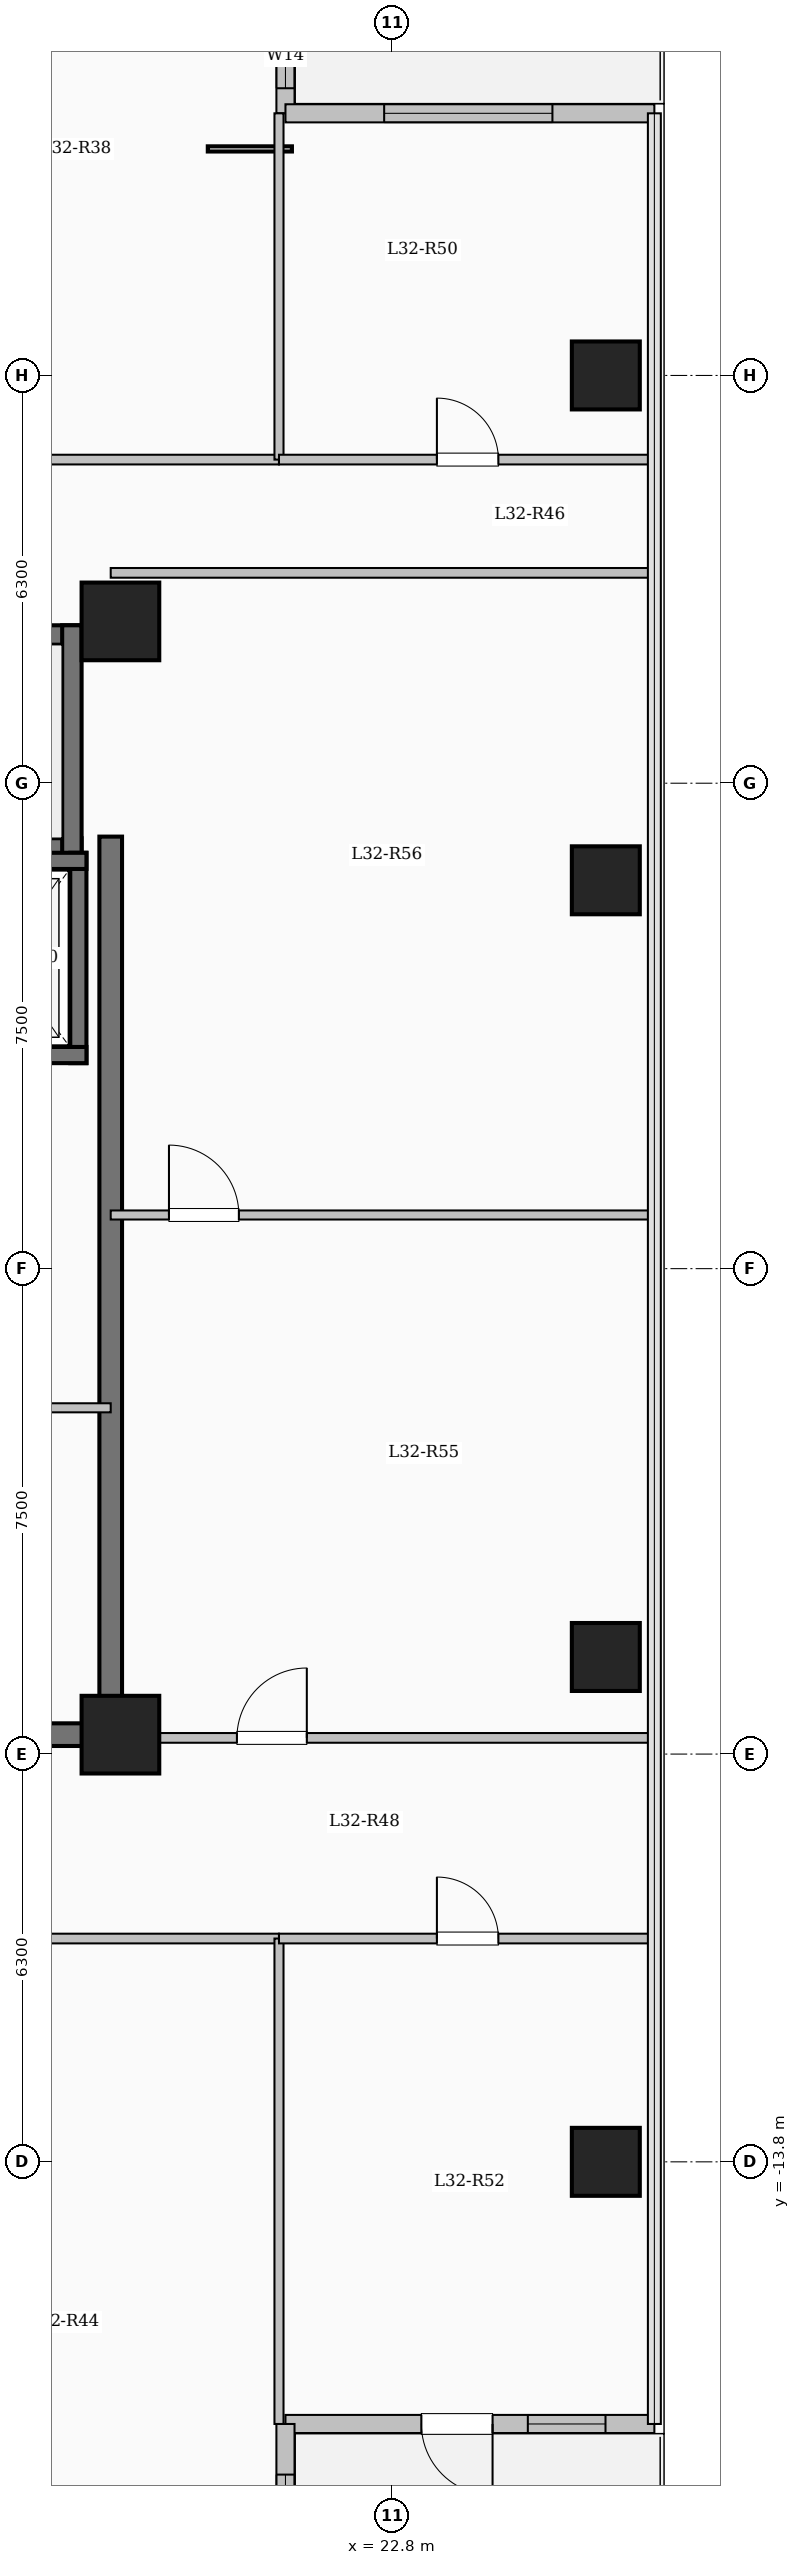
"""IFC4 building model, lengths in metres.
Left out: names, types, materials, properties, quantities, classifications, styles, units other than length and angle.
Written with IfcOpenShell. Run it as: python <this file> out.ifc"""

import sys

from ifc_helpers import new_model, si_unit, direction, frame, frame_2d, origin, origin_2d, place, context, subcontext, project, spatial, rectangle, extrude, element, fill, save


model = new_model("IFC4")
c1 = context("Model", 3, precision=1e-05, world=origin(), true_north=direction((0.0, 1.0)))
c2 = subcontext(c1, "Body", "Model", "MODEL_VIEW")
j1 = project(units=[si_unit("LENGTHUNIT", "METRE"), si_unit("PLANEANGLEUNIT", "RADIAN")], contexts=[c1])
p1 = place(None, origin())
s1 = spatial("IfcSite", under=j1, at=p1, CompositionType="ELEMENT")
p2 = place(p1, origin())
s2 = spatial("IfcBuilding", under=s1, at=p2, CompositionType="ELEMENT")
p3 = place(p2, frame((0.0, 0.0, 118.5)))
s3 = spatial("IfcBuildingStorey", under=s2, at=p3, CompositionType="ELEMENT", Elevation=118.5)
for number, where, z_axis, x_axis in (
    (1, (18.6, -7.2, 0.0), (0.0, 0.0, 1.0), (1.0, 0.0, 0.0)),
    (2, (18.6, 10.0, 0.0), (0.0, 0.0, 1.0), (1.0, 0.0, 0.0)),
):
    element("IfcColumn", number, at=place(p3, frame(where, z_axis=z_axis, x_axis=x_axis)), inside=s3, PredefinedType="COLUMN", context=c2, shape_type="SweptSolid", body=[
        extrude(rectangle(XDim=1.2, YDim=1.2, at=origin_2d()), origin(), (0.0, 0.0, 1.0), 4.5),
    ])
for number, where, z_axis, x_axis in (
    (3, (26.1, -13.8, 0.0), (0.0, 0.0, 1.0), (1.0, 0.0, 0.0)),
    (4, (26.1, -6.0, 0.0), (0.0, 0.0, 1.0), (1.0, 0.0, 0.0)),
    (5, (26.1, 6.0, 0.0), (0.0, 0.0, 1.0), (1.0, 0.0, 0.0)),
    (6, (26.1, 13.8, 0.0), (0.0, 0.0, 1.0), (1.0, 0.0, 0.0)),
):
    element("IfcColumn", number, at=place(p3, frame(where, z_axis=z_axis, x_axis=x_axis)), inside=s3, PredefinedType="COLUMN", context=c2, shape_type="SweptSolid", body=[
        extrude(rectangle(XDim=1.05, YDim=1.05, at=origin_2d()), origin(), (0.0, 0.0, 1.0), 4.5),
    ])
p4 = place(p3, frame((21.15, 22.05, 0.0), z_axis=(0.0, 0.0, 1.0), x_axis=(0.0, -1.0, 0.0)))
e7 = element("IfcWall", 7, at=p4, inside=s3, PredefinedType="SOLIDWALL", context=c2, shape_type="SweptSolid", body=[
    extrude(rectangle(XDim=4.2, YDim=0.28, at=frame_2d((2.1, 0.0))), origin(), (0.0, 0.0, 1.0), 4.2),
])
p5 = place(p4, frame((1.5, 0.0, 0.0)))
e8 = element("IfcOpeningElement", 8, at=p5, cuts=e7, PredefinedType="OPENING", context=c2, shape_type="SweptSolid", body=[
    extrude(rectangle(XDim=1.1, YDim=2.2, at=frame_2d((0.55, 1.1))), frame((0.0, 0.15, 0.0), z_axis=(0.0, -1.0, 0.0), x_axis=(1.0, 0.0, 0.0)), (0.0, 0.0, 1.0), 0.3),
])
p6 = place(p4, frame((2.812, 0.0, 0.95)))
e9 = element("IfcOpeningElement", 9, at=p6, cuts=e7, PredefinedType="OPENING", context=c2, shape_type="SweptSolid", body=[
    extrude(rectangle(XDim=1.0, YDim=1.5, at=frame_2d((0.5, 0.75))), frame((0.0, 0.15, 0.0), z_axis=(0.0, -1.0, 0.0), x_axis=(1.0, 0.0, 0.0)), (0.0, 0.0, 1.0), 0.3),
])
p7 = place(p3, frame((21.15, 17.85, 0.0), z_axis=(0.0, 0.0, 1.0), x_axis=(1.0, 0.0, 0.0)))
e10 = element("IfcWall", 10, at=p7, inside=s3, PredefinedType="SOLIDWALL", context=c2, shape_type="SweptSolid", body=[
    extrude(rectangle(XDim=5.7, YDim=0.28, at=frame_2d((2.85, 0.0))), origin(), (0.0, 0.0, 1.0), 4.2),
])
p8 = place(p7, frame((1.525, 0.0, 0.85)))
e11 = element("IfcOpeningElement", 11, at=p8, cuts=e10, PredefinedType="OPENING", context=c2, shape_type="SweptSolid", body=[
    extrude(rectangle(XDim=2.6, YDim=2.4, at=frame_2d((1.3, 1.2))), frame((0.0, 0.15, 0.0), z_axis=(0.0, -1.0, 0.0), x_axis=(1.0, 0.0, 0.0)), (0.0, 0.0, 1.0), 0.3),
])
p9 = place(p3, frame((26.85, -17.85, 0.0), z_axis=(0.0, 0.0, 1.0), x_axis=(-1.0, 0.0, 0.0)))
e12 = element("IfcWall", 12, at=p9, inside=s3, PredefinedType="SOLIDWALL", context=c2, shape_type="SweptSolid", body=[
    extrude(rectangle(XDim=5.7, YDim=0.28, at=frame_2d((2.85, 0.0))), origin(), (0.0, 0.0, 1.0), 4.2),
])
p10 = place(p9, frame((2.5, 0.0, 0.0)))
e13 = element("IfcOpeningElement", 13, at=p10, cuts=e12, PredefinedType="OPENING", context=c2, shape_type="SweptSolid", body=[
    extrude(rectangle(XDim=1.1, YDim=2.2, at=frame_2d((0.55, 1.1))), frame((0.0, 0.15, 0.0), z_axis=(0.0, -1.0, 0.0), x_axis=(1.0, 0.0, 0.0)), (0.0, 0.0, 1.0), 0.3),
])
p11 = place(p9, frame((0.755, 0.0, 0.95)))
e14 = element("IfcOpeningElement", 14, at=p11, cuts=e12, PredefinedType="OPENING", context=c2, shape_type="SweptSolid", body=[
    extrude(rectangle(XDim=1.2, YDim=1.5, at=frame_2d((0.6, 0.75))), frame((0.0, 0.15, 0.0), z_axis=(0.0, -1.0, 0.0), x_axis=(1.0, 0.0, 0.0)), (0.0, 0.0, 1.0), 0.3),
])
p12 = place(p3, frame((21.15, -17.85, 0.0), z_axis=(0.0, 0.0, 1.0), x_axis=(0.0, -1.0, 0.0)))
e15 = element("IfcWall", 15, at=p12, inside=s3, PredefinedType="SOLIDWALL", context=c2, shape_type="SweptSolid", body=[
    extrude(rectangle(XDim=4.2, YDim=0.28, at=frame_2d((2.1, 0.0))), origin(), (0.0, 0.0, 1.0), 4.2),
])
p13 = place(p12, frame((0.782, 0.0, 0.85)))
e16 = element("IfcOpeningElement", 16, at=p13, cuts=e15, PredefinedType="OPENING", context=c2, shape_type="SweptSolid", body=[
    extrude(rectangle(XDim=2.6, YDim=2.4, at=frame_2d((1.3, 1.2))), frame((0.0, 0.15, 0.0), z_axis=(0.0, -1.0, 0.0), x_axis=(1.0, 0.0, 0.0)), (0.0, 0.0, 1.0), 0.3),
])
p14 = place(p3, frame((10.0, 9.79, 0.0), z_axis=(0.0, 0.0, 1.0), x_axis=(1.0, 0.0, 0.0)))
e17 = element("IfcWall", 17, at=p14, inside=s3, PredefinedType="SHEAR", context=c2, shape_type="SweptSolid", body=[
    extrude(rectangle(XDim=8.0, YDim=0.3, at=frame_2d((4.0, 0.0))), origin(), (0.0, 0.0, 1.0), 4.5),
])
p15 = place(p3, frame((10.0, 6.5, 0.0), z_axis=(0.0, 0.0, 1.0), x_axis=(1.0, 0.0, 0.0)))
e18 = element("IfcWall", 18, at=p15, inside=s3, PredefinedType="SHEAR", context=c2, shape_type="SweptSolid", body=[
    extrude(rectangle(XDim=8.0, YDim=0.3, at=frame_2d((4.0, 0.0))), origin(), (0.0, 0.0, 1.0), 4.5),
])
p16 = place(p15, frame((0.55, 0.0, 0.0)))
e19 = element("IfcOpeningElement", 19, at=p16, cuts=e18, PredefinedType="OPENING", context=c2, shape_type="SweptSolid", body=[
    extrude(rectangle(XDim=1.0, YDim=2.15, at=frame_2d((0.5, 1.075))), frame((0.0, 0.16, 0.0), z_axis=(0.0, -1.0, 0.0), x_axis=(1.0, 0.0, 0.0)), (0.0, 0.0, 1.0), 0.32),
])
p17 = place(p3, frame((17.85, 6.35, 0.0), z_axis=(0.0, 0.0, 1.0), x_axis=(0.0, 1.0, 0.0)))
e20 = element("IfcWall", 20, at=p17, inside=s3, PredefinedType="SHEAR", context=c2, shape_type="SweptSolid", body=[
    extrude(rectangle(XDim=3.59, YDim=0.3, at=frame_2d((1.795, 0.0))), origin(), (0.0, 0.0, 1.0), 4.5),
])
p18 = place(p3, frame((17.95, 3.175, 0.0), z_axis=(0.0, 0.0, 1.0), x_axis=(0.0, 1.0, 0.0)))
e21 = element("IfcWall", 21, at=p18, inside=s3, PredefinedType="SHEAR", context=c2, shape_type="SweptSolid", body=[
    extrude(rectangle(XDim=3.25, YDim=0.25, at=frame_2d((1.625, 0.0))), origin(), (0.0, 0.0, 1.0), 4.5),
])
for number, where, z_axis, x_axis in (
    (22, (15.525, 3.3, 0.0), (0.0, 0.0, 1.0), (1.0, 0.0, 0.0)),
    (23, (15.525, 6.3, 0.0), (0.0, 0.0, 1.0), (1.0, 0.0, 0.0)),
):
    element("IfcWall", number, at=place(p3, frame(where, z_axis=z_axis, x_axis=x_axis)), inside=s3, PredefinedType="SHEAR", context=c2, shape_type="SweptSolid", body=[
        extrude(rectangle(XDim=2.55, YDim=0.25, at=frame_2d((1.275, 0.0))), origin(), (0.0, 0.0, 1.0), 4.5),
    ])
p19 = place(p3, frame((18.45, -7.375, 0.0), z_axis=(0.0, 0.0, 1.0), x_axis=(0.0, 1.0, 0.0)))
e24 = element("IfcWall", 24, at=p19, inside=s3, PredefinedType="SHEAR", context=c2, shape_type="SweptSolid", body=[
    extrude(rectangle(XDim=14.05, YDim=0.35, at=frame_2d((7.025, 0.0))), origin(), (0.0, 0.0, 1.0), 4.5),
])
p20 = place(p3, frame((10.075, -7.2, 0.0), z_axis=(0.0, 0.0, 1.0), x_axis=(1.0, 0.0, 0.0)))
e25 = element("IfcWall", 25, at=p20, inside=s3, PredefinedType="SHEAR", context=c2, shape_type="SweptSolid", body=[
    extrude(rectangle(XDim=8.55, YDim=0.35, at=frame_2d((4.275, 0.0))), origin(), (0.0, 0.0, 1.0), 4.5),
])
p21 = place(p3, frame((15.4, -2.15, 0.0), z_axis=(0.0, 0.0, 1.0), x_axis=(1.0, 0.0, 0.0)))
e26 = element("IfcWall", 26, at=p21, inside=s3, PredefinedType="PARTITIONING", context=c2, shape_type="SweptSolid", body=[
    extrude(rectangle(XDim=3.05, YDim=0.14, at=frame_2d((1.525, 0.0))), origin(), (0.0, 0.0, 1.0), 4.2),
])
p22 = place(p21, frame((1.05, 0.0, 0.0)))
e27 = element("IfcOpeningElement", 27, at=p22, cuts=e26, PredefinedType="OPENING", context=c2, shape_type="SweptSolid", body=[
    extrude(rectangle(XDim=0.9, YDim=2.08, at=frame_2d((0.45, 1.04))), frame((0.0, 0.08, 0.0), z_axis=(0.0, -1.0, 0.0), x_axis=(1.0, 0.0, 0.0)), (0.0, 0.0, 1.0), 0.16),
])
p23 = place(p3, frame((3.85, 12.5, 0.0), z_axis=(0.0, 0.0, 1.0), x_axis=(1.0, 0.0, 0.0)))
e28 = element("IfcWall", 28, at=p23, inside=s3, PredefinedType="PARTITIONING", context=c2, shape_type="SweptSolid", body=[
    extrude(rectangle(XDim=17.2, YDim=0.15, at=frame_2d((8.6, 0.0))), origin(), (0.0, 0.0, 1.0), 4.2),
])
p24 = place(p23, frame((0.8, 0.0, 0.0)))
e29 = element("IfcOpeningElement", 29, at=p24, cuts=e28, PredefinedType="OPENING", context=c2, shape_type="SweptSolid", body=[
    extrude(rectangle(XDim=0.95, YDim=2.15, at=frame_2d((0.475, 1.075))), frame((0.0, 0.085, 0.0), z_axis=(0.0, -1.0, 0.0), x_axis=(1.0, 0.0, 0.0)), (0.0, 0.0, 1.0), 0.17),
])
p25 = place(p23, frame((3.6, 0.0, 0.0)))
e30 = element("IfcOpeningElement", 30, at=p25, cuts=e28, PredefinedType="OPENING", context=c2, shape_type="SweptSolid", body=[
    extrude(rectangle(XDim=0.95, YDim=2.15, at=frame_2d((0.475, 1.075))), frame((0.0, 0.085, 0.0), z_axis=(0.0, -1.0, 0.0), x_axis=(1.0, 0.0, 0.0)), (0.0, 0.0, 1.0), 0.17),
])
p26 = place(p23, frame((6.55, 0.0, 0.0)))
e31 = element("IfcOpeningElement", 31, at=p26, cuts=e28, PredefinedType="OPENING", context=c2, shape_type="SweptSolid", body=[
    extrude(rectangle(XDim=1.08, YDim=2.15, at=frame_2d((0.54, 1.075))), frame((0.0, 0.085, 0.0), z_axis=(0.0, -1.0, 0.0), x_axis=(1.0, 0.0, 0.0)), (0.0, 0.0, 1.0), 0.17),
])
p27 = place(p23, frame((11.947, 0.0, 0.0)))
e32 = element("IfcOpeningElement", 32, at=p27, cuts=e28, PredefinedType="OPENING", context=c2, shape_type="SweptSolid", body=[
    extrude(rectangle(XDim=1.2, YDim=2.15, at=frame_2d((0.6, 1.075))), frame((0.0, 0.085, 0.0), z_axis=(0.0, -1.0, 0.0), x_axis=(1.0, 0.0, 0.0)), (0.0, 0.0, 1.0), 0.17),
])
p28 = place(p3, frame((8.55, -10.35, 0.0), z_axis=(0.0, 0.0, 1.0), x_axis=(1.0, 0.0, 0.0)))
e33 = element("IfcWall", 33, at=p28, inside=s3, PredefinedType="PARTITIONING", context=c2, shape_type="SweptSolid", body=[
    extrude(rectangle(XDim=12.5, YDim=0.15, at=frame_2d((6.25, 0.0))), origin(), (0.0, 0.0, 1.0), 4.2),
])
p29 = place(p28, frame((1.1, 0.0, 0.0)))
e34 = element("IfcOpeningElement", 34, at=p29, cuts=e33, PredefinedType="OPENING", context=c2, shape_type="SweptSolid", body=[
    extrude(rectangle(XDim=1.08, YDim=2.15, at=frame_2d((0.54, 1.075))), frame((0.0, 0.085, 0.0), z_axis=(0.0, -1.0, 0.0), x_axis=(1.0, 0.0, 0.0)), (0.0, 0.0, 1.0), 0.17),
])
p30 = place(p28, frame((6.777, 0.0, 0.0)))
e35 = element("IfcOpeningElement", 35, at=p30, cuts=e33, PredefinedType="OPENING", context=c2, shape_type="SweptSolid", body=[
    extrude(rectangle(XDim=1.2, YDim=2.15, at=frame_2d((0.6, 1.075))), frame((0.0, 0.085, 0.0), z_axis=(0.0, -1.0, 0.0), x_axis=(1.0, 0.0, 0.0)), (0.0, 0.0, 1.0), 0.17),
])
p31 = place(p3, frame((18.45, -7.25, 0.0), z_axis=(0.0, 0.0, 1.0), x_axis=(1.0, 0.0, 0.0)))
e36 = element("IfcWall", 36, at=p31, inside=s3, PredefinedType="PARTITIONING", context=c2, shape_type="SweptSolid", body=[
    extrude(rectangle(XDim=8.43, YDim=0.15, at=frame_2d((4.215, 0.0))), origin(), (0.0, 0.0, 1.0), 4.2),
])
p32 = place(p31, frame((1.95, 0.0, 0.0)))
e37 = element("IfcOpeningElement", 37, at=p32, cuts=e36, PredefinedType="OPENING", context=c2, shape_type="SweptSolid", body=[
    extrude(rectangle(XDim=1.08, YDim=2.15, at=frame_2d((0.54, 1.075))), frame((0.0, 0.085, 0.0), z_axis=(0.0, -1.0, 0.0), x_axis=(1.0, 0.0, 0.0)), (0.0, 0.0, 1.0), 0.17),
])
p33 = place(p3, frame((18.45, 10.75, 0.0), z_axis=(0.0, 0.0, 1.0), x_axis=(1.0, 0.0, 0.0)))
e38 = element("IfcWall", 38, at=p33, inside=s3, PredefinedType="PARTITIONING", context=c2, shape_type="SweptSolid", body=[
    extrude(rectangle(XDim=8.43, YDim=0.15, at=frame_2d((4.215, 0.0))), origin(), (0.0, 0.0, 1.0), 4.2),
])
p34 = place(p3, frame((21.05, -17.85, 0.0), z_axis=(0.0, 0.0, 1.0), x_axis=(0.0, 1.0, 0.0)))
e39 = element("IfcWall", 39, at=p34, inside=s3, PredefinedType="PARTITIONING", context=c2, shape_type="SweptSolid", body=[
    extrude(rectangle(XDim=7.5, YDim=0.14, at=frame_2d((3.75, 0.0))), origin(), (0.0, 0.0, 1.0), 4.2),
])
p35 = place(p3, frame((21.05, 12.5, 0.0), z_axis=(0.0, 0.0, 1.0), x_axis=(0.0, 1.0, 0.0)))
e40 = element("IfcWall", 40, at=p35, inside=s3, PredefinedType="PARTITIONING", context=c2, shape_type="SweptSolid", body=[
    extrude(rectangle(XDim=5.35, YDim=0.14, at=frame_2d((2.675, 0.0))), origin(), (0.0, 0.0, 1.0), 4.2),
])
p36 = place(p3, frame((21.05, 12.5, 0.0), z_axis=(0.0, 0.0, 1.0), x_axis=(1.0, 0.0, 0.0)))
e41 = element("IfcWall", 41, at=p36, inside=s3, PredefinedType="PARTITIONING", context=c2, shape_type="SweptSolid", body=[
    extrude(rectangle(XDim=5.83, YDim=0.15, at=frame_2d((2.915, 0.0))), origin(), (0.0, 0.0, 1.0), 4.2),
])
p37 = place(p36, frame((2.44, 0.0, 0.0)))
e42 = element("IfcOpeningElement", 42, at=p37, cuts=e41, PredefinedType="OPENING", context=c2, shape_type="SweptSolid", body=[
    extrude(rectangle(XDim=0.95, YDim=2.15, at=frame_2d((0.475, 1.075))), frame((0.0, 0.085, 0.0), z_axis=(0.0, -1.0, 0.0), x_axis=(1.0, 0.0, 0.0)), (0.0, 0.0, 1.0), 0.17),
])
p38 = place(p3, frame((21.05, -10.35, 0.0), z_axis=(0.0, 0.0, 1.0), x_axis=(1.0, 0.0, 0.0)))
e43 = element("IfcWall", 43, at=p38, inside=s3, PredefinedType="PARTITIONING", context=c2, shape_type="SweptSolid", body=[
    extrude(rectangle(XDim=5.83, YDim=0.15, at=frame_2d((2.915, 0.0))), origin(), (0.0, 0.0, 1.0), 4.2),
])
p39 = place(p38, frame((2.44, 0.0, 0.0)))
e44 = element("IfcOpeningElement", 44, at=p39, cuts=e43, PredefinedType="OPENING", context=c2, shape_type="SweptSolid", body=[
    extrude(rectangle(XDim=0.95, YDim=2.15, at=frame_2d((0.475, 1.075))), frame((0.0, 0.085, 0.0), z_axis=(0.0, -1.0, 0.0), x_axis=(1.0, 0.0, 0.0)), (0.0, 0.0, 1.0), 0.17),
])
p40 = place(p3, frame((18.45, 0.829, 0.0), z_axis=(0.0, 0.0, 1.0), x_axis=(1.0, 0.0, 0.0)))
e45 = element("IfcWall", 45, at=p40, inside=s3, PredefinedType="PARTITIONING", context=c2, shape_type="SweptSolid", body=[
    extrude(rectangle(XDim=8.43, YDim=0.14, at=frame_2d((4.215, 0.0))), origin(), (0.0, 0.0, 1.0), 4.2),
])
p41 = place(p40, frame((0.9, 0.0, 0.0)))
e46 = element("IfcOpeningElement", 46, at=p41, cuts=e45, PredefinedType="OPENING", context=c2, shape_type="SweptSolid", body=[
    extrude(rectangle(XDim=1.08, YDim=2.15, at=frame_2d((0.54, 1.075))), frame((0.0, 0.08, 0.0), z_axis=(0.0, -1.0, 0.0), x_axis=(1.0, 0.0, 0.0)), (0.0, 0.0, 1.0), 0.16),
])
p42 = place(p6, origin())
e47 = element("IfcWindow", 47, at=p42, inside=s3, PartitioningType="SINGLE_PANEL", PredefinedType="WINDOW", context=c2, shape_type="SweptSolid", body=[
    extrude(rectangle(XDim=1.0, YDim=1.5, at=frame_2d((0.5, 0.75))), frame((0.0, 0.03, 0.0), z_axis=(0.0, -1.0, 0.0), x_axis=(1.0, 0.0, 0.0)), (0.0, 0.0, 1.0), 0.06),
])
fill(e9, e47)
p43 = place(p8, origin())
e48 = element("IfcWindow", 48, at=p43, inside=s3, PartitioningType="SINGLE_PANEL", PredefinedType="WINDOW", context=c2, shape_type="SweptSolid", body=[
    extrude(rectangle(XDim=2.6, YDim=2.4, at=frame_2d((1.3, 1.2))), frame((0.0, 0.03, 0.0), z_axis=(0.0, -1.0, 0.0), x_axis=(1.0, 0.0, 0.0)), (0.0, 0.0, 1.0), 0.06),
])
fill(e11, e48)
p44 = place(p10, origin())
e49 = element("IfcDoor", 49, at=p44, inside=s3, OperationType="SINGLE_SWING_LEFT", PredefinedType="DOOR", context=c2, shape_type="SweptSolid", body=[
    extrude(rectangle(XDim=1.1, YDim=2.2, at=frame_2d((0.55, 1.1))), frame((0.0, 0.025, 0.0), z_axis=(0.0, -1.0, 0.0), x_axis=(1.0, 0.0, 0.0)), (0.0, 0.0, 1.0), 0.05),
])
fill(e13, e49)
p45 = place(p11, origin())
e50 = element("IfcWindow", 50, at=p45, inside=s3, PartitioningType="SINGLE_PANEL", PredefinedType="WINDOW", context=c2, shape_type="SweptSolid", body=[
    extrude(rectangle(XDim=1.2, YDim=1.5, at=frame_2d((0.6, 0.75))), frame((0.0, 0.03, 0.0), z_axis=(0.0, -1.0, 0.0), x_axis=(1.0, 0.0, 0.0)), (0.0, 0.0, 1.0), 0.06),
])
fill(e14, e50)
p46 = place(p13, origin())
e51 = element("IfcWindow", 51, at=p46, inside=s3, PartitioningType="SINGLE_PANEL", PredefinedType="WINDOW", context=c2, shape_type="SweptSolid", body=[
    extrude(rectangle(XDim=2.6, YDim=2.4, at=frame_2d((1.3, 1.2))), frame((0.0, 0.03, 0.0), z_axis=(0.0, -1.0, 0.0), x_axis=(1.0, 0.0, 0.0)), (0.0, 0.0, 1.0), 0.06),
])
fill(e16, e51)
p47 = place(p37, origin())
e52 = element("IfcDoor", 52, at=p47, inside=s3, OperationType="SINGLE_SWING_LEFT", PredefinedType="DOOR", context=c2, shape_type="SweptSolid", body=[
    extrude(rectangle(XDim=0.95, YDim=2.15, at=frame_2d((0.475, 1.075))), frame((0.0, 0.025, 0.0), z_axis=(0.0, -1.0, 0.0), x_axis=(1.0, 0.0, 0.0)), (0.0, 0.0, 1.0), 0.05),
])
fill(e42, e52)
p48 = place(p39, origin())
e53 = element("IfcDoor", 53, at=p48, inside=s3, OperationType="SINGLE_SWING_LEFT", PredefinedType="DOOR", context=c2, shape_type="SweptSolid", body=[
    extrude(rectangle(XDim=0.95, YDim=2.15, at=frame_2d((0.475, 1.075))), frame((0.0, 0.025, 0.0), z_axis=(0.0, -1.0, 0.0), x_axis=(1.0, 0.0, 0.0)), (0.0, 0.0, 1.0), 0.05),
])
fill(e44, e53)
p49 = place(p32, origin())
e54 = element("IfcDoor", 54, at=p49, inside=s3, OperationType="SINGLE_SWING_RIGHT", PredefinedType="DOOR", context=c2, shape_type="SweptSolid", body=[
    extrude(rectangle(XDim=1.08, YDim=2.15, at=frame_2d((0.54, 1.075))), frame((0.0, 0.025, 0.0), z_axis=(0.0, -1.0, 0.0), x_axis=(1.0, 0.0, 0.0)), (0.0, 0.0, 1.0), 0.05),
])
fill(e37, e54)
p50 = place(p41, origin())
e55 = element("IfcDoor", 55, at=p50, inside=s3, OperationType="SINGLE_SWING_LEFT", PredefinedType="DOOR", context=c2, shape_type="SweptSolid", body=[
    extrude(rectangle(XDim=1.08, YDim=2.15, at=frame_2d((0.54, 1.075))), frame((0.0, 0.025, 0.0), z_axis=(0.0, -1.0, 0.0), x_axis=(1.0, 0.0, 0.0)), (0.0, 0.0, 1.0), 0.05),
])
fill(e46, e55)
save(model, sys.argv[1])
